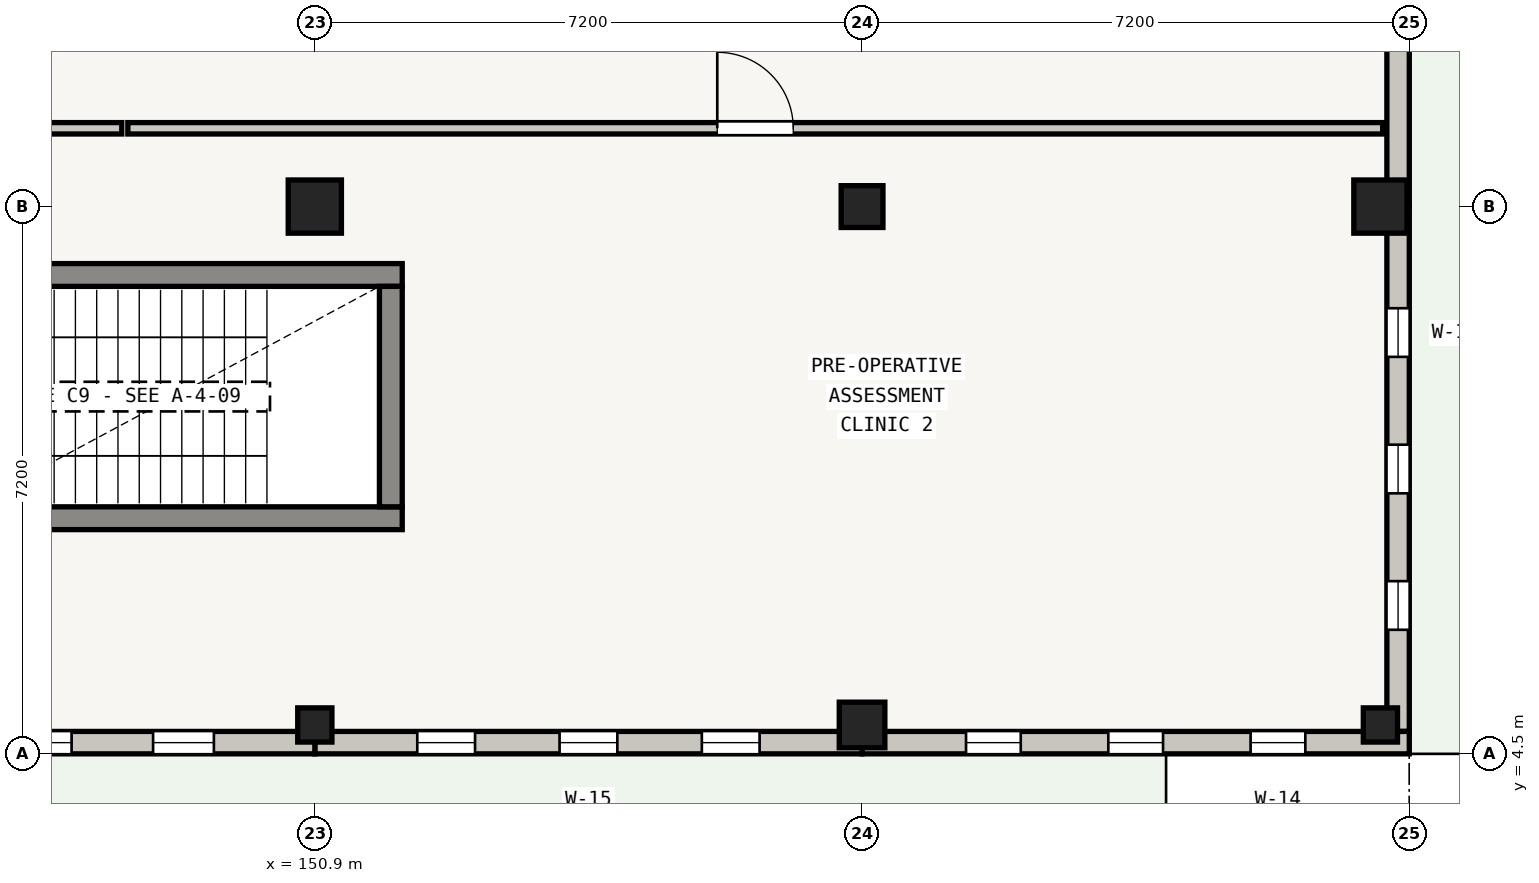
"""IFC4 building model, lengths in metres.
Left out: names, types, materials, properties, quantities, classifications, styles, units other than length and angle.
Written with IfcOpenShell. Run it as: python <this file> out.ifc"""

import sys

from ifc_helpers import new_model, si_unit, direction, frame, frame_2d, origin, origin_2d, place, context, subcontext, project, spatial, rectangle, extrude, element, fill, save


model = new_model("IFC4")
c1 = context("Model", 3, precision=1e-05, world=origin(), true_north=direction((0.0, 1.0)))
c2 = subcontext(c1, "Body", "Model", "MODEL_VIEW")
j1 = project(units=[si_unit("LENGTHUNIT", "METRE"), si_unit("PLANEANGLEUNIT", "RADIAN")], contexts=[c1])
p1 = place(None, origin())
s1 = spatial("IfcSite", under=j1, at=p1, CompositionType="ELEMENT")
p2 = place(p1, origin())
s2 = spatial("IfcBuilding", under=s1, at=p2, CompositionType="ELEMENT")
p3 = place(p2, origin())
s3 = spatial("IfcBuildingStorey", under=s2, at=p3, CompositionType="ELEMENT", Elevation=0.0)
p4 = place(p3, frame((150.9, 4.88, 0.0), z_axis=(0.0, 0.0, 1.0), x_axis=(1.0, 0.0, 0.0)))
e1 = element("IfcColumn", 1, at=p4, inside=s3, PredefinedType="COLUMN", context=c2, shape_type="SweptSolid", body=[
    extrude(rectangle(XDim=0.45, YDim=0.45, at=origin_2d()), origin(), (0.0, 0.0, 1.0), 4.205),
])
p5 = place(p3, frame((150.9, 11.7, 0.0), z_axis=(0.0, 0.0, 1.0), x_axis=(1.0, 0.0, 0.0)))
e2 = element("IfcColumn", 2, at=p5, inside=s3, PredefinedType="COLUMN", context=c2, shape_type="SweptSolid", body=[
    extrude(rectangle(XDim=0.7, YDim=0.7, at=origin_2d()), origin(), (0.0, 0.0, 1.0), 4.205),
])
p6 = place(p3, frame((158.1, 4.88, 0.0), z_axis=(0.0, 0.0, 1.0), x_axis=(1.0, 0.0, 0.0)))
e3 = element("IfcColumn", 3, at=p6, inside=s3, PredefinedType="COLUMN", context=c2, shape_type="SweptSolid", body=[
    extrude(rectangle(XDim=0.6, YDim=0.6, at=origin_2d()), origin(), (0.0, 0.0, 1.0), 4.205),
])
p7 = place(p3, frame((158.1, 11.7, 0.0), z_axis=(0.0, 0.0, 1.0), x_axis=(1.0, 0.0, 0.0)))
e4 = element("IfcColumn", 4, at=p7, inside=s3, PredefinedType="COLUMN", context=c2, shape_type="SweptSolid", body=[
    extrude(rectangle(XDim=0.55, YDim=0.55, at=origin_2d()), origin(), (0.0, 0.0, 1.0), 4.205),
])
p8 = place(p3, frame((164.92, 4.88, 0.0), z_axis=(0.0, 0.0, 1.0), x_axis=(1.0, 0.0, 0.0)))
e5 = element("IfcColumn", 5, at=p8, inside=s3, PredefinedType="COLUMN", context=c2, shape_type="SweptSolid", body=[
    extrude(rectangle(XDim=0.45, YDim=0.45, at=origin_2d()), origin(), (0.0, 0.0, 1.0), 4.205),
])
p9 = place(p3, frame((164.92, 11.7, 0.0), z_axis=(0.0, 0.0, 1.0), x_axis=(1.0, 0.0, 0.0)))
e6 = element("IfcColumn", 6, at=p9, inside=s3, PredefinedType="COLUMN", context=c2, shape_type="SweptSolid", body=[
    extrude(rectangle(XDim=0.7, YDim=0.7, at=origin_2d()), origin(), (0.0, 0.0, 1.0), 4.205),
])
p10 = place(p3, frame((165.153, 18.605, 0.0), z_axis=(0.0, 0.0, 1.0), x_axis=(0.0, -1.0, 0.0)))
e7 = element("IfcWall", 7, at=p10, inside=s3, PredefinedType="STANDARD", context=c2, shape_type="SweptSolid", body=[
    extrude(rectangle(XDim=6.905, YDim=0.295, at=frame_2d((3.453, 0.0))), origin(), (0.0, 0.0, 1.0), 3.57),
])
p11 = place(p10, frame((1.357, 0.0, 0.55)))
e8 = element("IfcOpeningElement", 8, at=p11, cuts=e7, PredefinedType="OPENING", context=c2, shape_type="SweptSolid", body=[
    extrude(rectangle(XDim=0.6, YDim=2.28, at=frame_2d((0.3, 1.14))), frame((0.0, 0.147, 0.0), z_axis=(0.0, -1.0, 0.0), x_axis=(1.0, 0.0, 0.0)), (0.0, 0.0, 1.0), 0.295),
])
p12 = place(p10, frame((3.903, 0.0, 0.55)))
e9 = element("IfcOpeningElement", 9, at=p12, cuts=e7, PredefinedType="OPENING", context=c2, shape_type="SweptSolid", body=[
    extrude(rectangle(XDim=0.6, YDim=2.28, at=frame_2d((0.3, 1.14))), frame((0.0, 0.147, 0.0), z_axis=(0.0, -1.0, 0.0), x_axis=(1.0, 0.0, 0.0)), (0.0, 0.0, 1.0), 0.295),
])
p13 = place(p3, frame((165.153, 11.7, 0.0), z_axis=(0.0, 0.0, 1.0), x_axis=(0.0, -1.0, 0.0)))
e10 = element("IfcWall", 10, at=p13, inside=s3, PredefinedType="STANDARD", context=c2, shape_type="SweptSolid", body=[
    extrude(rectangle(XDim=6.905, YDim=0.295, at=frame_2d((3.453, 0.0))), origin(), (0.0, 0.0, 1.0), 3.57),
])
p14 = place(p13, frame((1.337, 0.0, 0.55)))
e11 = element("IfcOpeningElement", 11, at=p14, cuts=e10, PredefinedType="OPENING", context=c2, shape_type="SweptSolid", body=[
    extrude(rectangle(XDim=0.64, YDim=2.28, at=frame_2d((0.32, 1.14))), frame((0.0, 0.147, 0.0), z_axis=(0.0, -1.0, 0.0), x_axis=(1.0, 0.0, 0.0)), (0.0, 0.0, 1.0), 0.295),
])
p15 = place(p13, frame((3.133, 0.0, 0.55)))
e12 = element("IfcOpeningElement", 12, at=p15, cuts=e10, PredefinedType="OPENING", context=c2, shape_type="SweptSolid", body=[
    extrude(rectangle(XDim=0.64, YDim=2.28, at=frame_2d((0.32, 1.14))), frame((0.0, 0.147, 0.0), z_axis=(0.0, -1.0, 0.0), x_axis=(1.0, 0.0, 0.0)), (0.0, 0.0, 1.0), 0.295),
])
p16 = place(p13, frame((4.928, 0.0, 0.55)))
e13 = element("IfcOpeningElement", 13, at=p16, cuts=e10, PredefinedType="OPENING", context=c2, shape_type="SweptSolid", body=[
    extrude(rectangle(XDim=0.64, YDim=2.28, at=frame_2d((0.32, 1.14))), frame((0.0, 0.147, 0.0), z_axis=(0.0, -1.0, 0.0), x_axis=(1.0, 0.0, 0.0)), (0.0, 0.0, 1.0), 0.295),
])
p17 = place(p3, frame((165.3, 4.647, 0.0), z_axis=(0.0, 0.0, 1.0), x_axis=(-1.0, 0.0, 0.0)))
e14 = element("IfcWall", 14, at=p17, inside=s3, PredefinedType="STANDARD", context=c2, shape_type="SweptSolid", body=[
    extrude(rectangle(XDim=7.2, YDim=0.295, at=frame_2d((3.6, 0.0))), origin(), (0.0, 0.0, 1.0), 3.61),
])
p18 = place(p17, frame((1.368, 0.0, 0.55)))
e15 = element("IfcOpeningElement", 15, at=p18, cuts=e14, PredefinedType="OPENING", context=c2, shape_type="SweptSolid", body=[
    extrude(rectangle(XDim=0.72, YDim=2.22, at=frame_2d((0.36, 1.11))), frame((0.0, 0.147, 0.0), z_axis=(0.0, -1.0, 0.0), x_axis=(1.0, 0.0, 0.0)), (0.0, 0.0, 1.0), 0.295),
])
p19 = place(p17, frame((3.24, 0.0, 0.55)))
e16 = element("IfcOpeningElement", 16, at=p19, cuts=e14, PredefinedType="OPENING", context=c2, shape_type="SweptSolid", body=[
    extrude(rectangle(XDim=0.72, YDim=2.22, at=frame_2d((0.36, 1.11))), frame((0.0, 0.147, 0.0), z_axis=(0.0, -1.0, 0.0), x_axis=(1.0, 0.0, 0.0)), (0.0, 0.0, 1.0), 0.295),
])
p20 = place(p17, frame((5.112, 0.0, 0.55)))
e17 = element("IfcOpeningElement", 17, at=p20, cuts=e14, PredefinedType="OPENING", context=c2, shape_type="SweptSolid", body=[
    extrude(rectangle(XDim=0.72, YDim=2.22, at=frame_2d((0.36, 1.11))), frame((0.0, 0.147, 0.0), z_axis=(0.0, -1.0, 0.0), x_axis=(1.0, 0.0, 0.0)), (0.0, 0.0, 1.0), 0.295),
])
p21 = place(p3, frame((158.1, 4.647, 0.0), z_axis=(0.0, 0.0, 1.0), x_axis=(-1.0, 0.0, 0.0)))
e18 = element("IfcWall", 18, at=p21, inside=s3, PredefinedType="STANDARD", context=c2, shape_type="SweptSolid", body=[
    extrude(rectangle(XDim=7.2, YDim=0.295, at=frame_2d((3.6, 0.0))), origin(), (0.0, 0.0, 1.0), 3.59),
])
p22 = place(p21, frame((1.348, 0.0, 0.55)))
e19 = element("IfcOpeningElement", 19, at=p22, cuts=e18, PredefinedType="OPENING", context=c2, shape_type="SweptSolid", body=[
    extrude(rectangle(XDim=0.76, YDim=2.16, at=frame_2d((0.38, 1.08))), frame((0.0, 0.147, 0.0), z_axis=(0.0, -1.0, 0.0), x_axis=(1.0, 0.0, 0.0)), (0.0, 0.0, 1.0), 0.295),
])
p23 = place(p21, frame((3.22, 0.0, 0.55)))
e20 = element("IfcOpeningElement", 20, at=p23, cuts=e18, PredefinedType="OPENING", context=c2, shape_type="SweptSolid", body=[
    extrude(rectangle(XDim=0.76, YDim=2.16, at=frame_2d((0.38, 1.08))), frame((0.0, 0.147, 0.0), z_axis=(0.0, -1.0, 0.0), x_axis=(1.0, 0.0, 0.0)), (0.0, 0.0, 1.0), 0.295),
])
p24 = place(p21, frame((5.092, 0.0, 0.55)))
e21 = element("IfcOpeningElement", 21, at=p24, cuts=e18, PredefinedType="OPENING", context=c2, shape_type="SweptSolid", body=[
    extrude(rectangle(XDim=0.76, YDim=2.16, at=frame_2d((0.38, 1.08))), frame((0.0, 0.147, 0.0), z_axis=(0.0, -1.0, 0.0), x_axis=(1.0, 0.0, 0.0)), (0.0, 0.0, 1.0), 0.295),
])
p25 = place(p3, frame((150.9, 4.647, 0.0), z_axis=(0.0, 0.0, 1.0), x_axis=(-1.0, 0.0, 0.0)))
e22 = element("IfcWall", 22, at=p25, inside=s3, PredefinedType="STANDARD", context=c2, shape_type="SweptSolid", body=[
    extrude(rectangle(XDim=7.2, YDim=0.295, at=frame_2d((3.6, 0.0))), origin(), (0.0, 0.0, 1.0), 3.59),
])
p26 = place(p25, frame((1.328, 0.0, 0.55)))
e23 = element("IfcOpeningElement", 23, at=p26, cuts=e22, PredefinedType="OPENING", context=c2, shape_type="SweptSolid", body=[
    extrude(rectangle(XDim=0.8, YDim=2.16, at=frame_2d((0.4, 1.08))), frame((0.0, 0.147, 0.0), z_axis=(0.0, -1.0, 0.0), x_axis=(1.0, 0.0, 0.0)), (0.0, 0.0, 1.0), 0.295),
])
p27 = place(p25, frame((3.2, 0.0, 0.55)))
e24 = element("IfcOpeningElement", 24, at=p27, cuts=e22, PredefinedType="OPENING", context=c2, shape_type="SweptSolid", body=[
    extrude(rectangle(XDim=0.8, YDim=2.16, at=frame_2d((0.4, 1.08))), frame((0.0, 0.147, 0.0), z_axis=(0.0, -1.0, 0.0), x_axis=(1.0, 0.0, 0.0)), (0.0, 0.0, 1.0), 0.295),
])
p28 = place(p25, frame((5.072, 0.0, 0.55)))
e25 = element("IfcOpeningElement", 25, at=p28, cuts=e22, PredefinedType="OPENING", context=c2, shape_type="SweptSolid", body=[
    extrude(rectangle(XDim=0.8, YDim=2.16, at=frame_2d((0.4, 1.08))), frame((0.0, 0.147, 0.0), z_axis=(0.0, -1.0, 0.0), x_axis=(1.0, 0.0, 0.0)), (0.0, 0.0, 1.0), 0.295),
])
p29 = place(p3, frame((152.05, 7.6, 0.0), z_axis=(0.0, 0.0, 1.0), x_axis=(-1.0, 0.0, 0.0)))
e26 = element("IfcWall", 26, at=p29, inside=s3, PredefinedType="SHEAR", context=c2, shape_type="SweptSolid", body=[
    extrude(rectangle(XDim=7.3, YDim=0.3, at=frame_2d((3.65, 0.0))), origin(), (0.0, 0.0, 1.0), 4.205),
])
p30 = place(p3, frame((144.75, 10.8, 0.0), z_axis=(0.0, 0.0, 1.0), x_axis=(1.0, 0.0, 0.0)))
e27 = element("IfcWall", 27, at=p30, inside=s3, PredefinedType="SHEAR", context=c2, shape_type="SweptSolid", body=[
    extrude(rectangle(XDim=7.3, YDim=0.3, at=frame_2d((3.65, 0.0))), origin(), (0.0, 0.0, 1.0), 4.205),
])
p31 = place(p30, frame((0.16, 0.0, 0.0)))
e28 = element("IfcOpeningElement", 28, at=p31, cuts=e27, PredefinedType="OPENING", context=c2, shape_type="SweptSolid", body=[
    extrude(rectangle(XDim=1.1, YDim=2.05, at=frame_2d((0.55, 1.025))), frame((0.0, 0.15, 0.0), z_axis=(0.0, -1.0, 0.0), x_axis=(1.0, 0.0, 0.0)), (0.0, 0.0, 1.0), 0.3),
])
p32 = place(p3, frame((151.9, 10.65, 0.0), z_axis=(0.0, 0.0, 1.0), x_axis=(0.0, -1.0, 0.0)))
e29 = element("IfcWall", 29, at=p32, inside=s3, PredefinedType="SHEAR", context=c2, shape_type="SweptSolid", body=[
    extrude(rectangle(XDim=2.9, YDim=0.3, at=frame_2d((1.45, 0.0))), origin(), (0.0, 0.0, 1.0), 4.205),
])
p33 = place(p3, frame((148.44, 12.73, 0.0), z_axis=(0.0, 0.0, 1.0), x_axis=(1.0, 0.0, 0.0)))
e30 = element("IfcWall", 30, at=p33, inside=s3, PredefinedType="PARTITIONING", context=c2, shape_type="SweptSolid", body=[
    extrude(rectangle(XDim=16.51, YDim=0.15, at=frame_2d((8.255, 0.0))), origin(), (0.0, 0.0, 1.0), 3.225),
])
p34 = place(p33, frame((7.755, 0.0, 0.0)))
e31 = element("IfcOpeningElement", 31, at=p34, cuts=e30, PredefinedType="OPENING", context=c2, shape_type="SweptSolid", body=[
    extrude(rectangle(XDim=1.0, YDim=2.05, at=frame_2d((0.5, 1.025))), frame((0.0, 0.075, 0.0), z_axis=(0.0, -1.0, 0.0), x_axis=(1.0, 0.0, 0.0)), (0.0, 0.0, 1.0), 0.15),
])
p35 = place(p3, frame((133.66, 12.73, 0.0), z_axis=(0.0, 0.0, 1.0), x_axis=(1.0, 0.0, 0.0)))
e32 = element("IfcWall", 32, at=p35, inside=s3, PredefinedType="PARTITIONING", context=c2, shape_type="SweptSolid", body=[
    extrude(rectangle(XDim=14.7, YDim=0.15, at=frame_2d((7.35, 0.0))), origin(), (0.0, 0.0, 1.0), 3.225),
])
p36 = place(p35, frame((6.83, 0.0, 0.0)))
e33 = element("IfcOpeningElement", 33, at=p36, cuts=e32, PredefinedType="OPENING", context=c2, shape_type="SweptSolid", body=[
    extrude(rectangle(XDim=1.04, YDim=2.05, at=frame_2d((0.52, 1.025))), frame((0.0, 0.075, 0.0), z_axis=(0.0, -1.0, 0.0), x_axis=(1.0, 0.0, 0.0)), (0.0, 0.0, 1.0), 0.15),
])
p37 = place(p14, origin())
e34 = element("IfcWindow", 34, at=p37, inside=s3, PartitioningType="SINGLE_PANEL", PredefinedType="WINDOW", context=c2, shape_type="SweptSolid", body=[
    extrude(rectangle(XDim=0.64, YDim=2.28, at=frame_2d((0.32, 1.14))), frame((0.0, 0.03, 0.0), z_axis=(0.0, -1.0, 0.0), x_axis=(1.0, 0.0, 0.0)), (0.0, 0.0, 1.0), 0.06),
])
fill(e11, e34)
p38 = place(p15, origin())
e35 = element("IfcWindow", 35, at=p38, inside=s3, PartitioningType="SINGLE_PANEL", PredefinedType="WINDOW", context=c2, shape_type="SweptSolid", body=[
    extrude(rectangle(XDim=0.64, YDim=2.28, at=frame_2d((0.32, 1.14))), frame((0.0, 0.03, 0.0), z_axis=(0.0, -1.0, 0.0), x_axis=(1.0, 0.0, 0.0)), (0.0, 0.0, 1.0), 0.06),
])
fill(e12, e35)
p39 = place(p16, origin())
e36 = element("IfcWindow", 36, at=p39, inside=s3, PartitioningType="SINGLE_PANEL", PredefinedType="WINDOW", context=c2, shape_type="SweptSolid", body=[
    extrude(rectangle(XDim=0.64, YDim=2.28, at=frame_2d((0.32, 1.14))), frame((0.0, 0.03, 0.0), z_axis=(0.0, -1.0, 0.0), x_axis=(1.0, 0.0, 0.0)), (0.0, 0.0, 1.0), 0.06),
])
fill(e13, e36)
p40 = place(p18, origin())
e37 = element("IfcWindow", 37, at=p40, inside=s3, PartitioningType="SINGLE_PANEL", PredefinedType="WINDOW", context=c2, shape_type="SweptSolid", body=[
    extrude(rectangle(XDim=0.72, YDim=2.22, at=frame_2d((0.36, 1.11))), frame((0.0, 0.03, 0.0), z_axis=(0.0, -1.0, 0.0), x_axis=(1.0, 0.0, 0.0)), (0.0, 0.0, 1.0), 0.06),
])
fill(e15, e37)
p41 = place(p19, origin())
e38 = element("IfcWindow", 38, at=p41, inside=s3, PartitioningType="SINGLE_PANEL", PredefinedType="WINDOW", context=c2, shape_type="SweptSolid", body=[
    extrude(rectangle(XDim=0.72, YDim=2.22, at=frame_2d((0.36, 1.11))), frame((0.0, 0.03, 0.0), z_axis=(0.0, -1.0, 0.0), x_axis=(1.0, 0.0, 0.0)), (0.0, 0.0, 1.0), 0.06),
])
fill(e16, e38)
p42 = place(p20, origin())
e39 = element("IfcWindow", 39, at=p42, inside=s3, PartitioningType="SINGLE_PANEL", PredefinedType="WINDOW", context=c2, shape_type="SweptSolid", body=[
    extrude(rectangle(XDim=0.72, YDim=2.22, at=frame_2d((0.36, 1.11))), frame((0.0, 0.03, 0.0), z_axis=(0.0, -1.0, 0.0), x_axis=(1.0, 0.0, 0.0)), (0.0, 0.0, 1.0), 0.06),
])
fill(e17, e39)
p43 = place(p22, origin())
e40 = element("IfcWindow", 40, at=p43, inside=s3, PartitioningType="SINGLE_PANEL", PredefinedType="WINDOW", context=c2, shape_type="SweptSolid", body=[
    extrude(rectangle(XDim=0.76, YDim=2.16, at=frame_2d((0.38, 1.08))), frame((0.0, 0.03, 0.0), z_axis=(0.0, -1.0, 0.0), x_axis=(1.0, 0.0, 0.0)), (0.0, 0.0, 1.0), 0.06),
])
fill(e19, e40)
p44 = place(p23, origin())
e41 = element("IfcWindow", 41, at=p44, inside=s3, PartitioningType="SINGLE_PANEL", PredefinedType="WINDOW", context=c2, shape_type="SweptSolid", body=[
    extrude(rectangle(XDim=0.76, YDim=2.16, at=frame_2d((0.38, 1.08))), frame((0.0, 0.03, 0.0), z_axis=(0.0, -1.0, 0.0), x_axis=(1.0, 0.0, 0.0)), (0.0, 0.0, 1.0), 0.06),
])
fill(e20, e41)
p45 = place(p24, origin())
e42 = element("IfcWindow", 42, at=p45, inside=s3, PartitioningType="SINGLE_PANEL", PredefinedType="WINDOW", context=c2, shape_type="SweptSolid", body=[
    extrude(rectangle(XDim=0.76, YDim=2.16, at=frame_2d((0.38, 1.08))), frame((0.0, 0.03, 0.0), z_axis=(0.0, -1.0, 0.0), x_axis=(1.0, 0.0, 0.0)), (0.0, 0.0, 1.0), 0.06),
])
fill(e21, e42)
p46 = place(p26, origin())
e43 = element("IfcWindow", 43, at=p46, inside=s3, PartitioningType="SINGLE_PANEL", PredefinedType="WINDOW", context=c2, shape_type="SweptSolid", body=[
    extrude(rectangle(XDim=0.8, YDim=2.16, at=frame_2d((0.4, 1.08))), frame((0.0, 0.03, 0.0), z_axis=(0.0, -1.0, 0.0), x_axis=(1.0, 0.0, 0.0)), (0.0, 0.0, 1.0), 0.06),
])
fill(e23, e43)
p47 = place(p27, origin())
e44 = element("IfcWindow", 44, at=p47, inside=s3, PartitioningType="SINGLE_PANEL", PredefinedType="WINDOW", context=c2, shape_type="SweptSolid", body=[
    extrude(rectangle(XDim=0.8, YDim=2.16, at=frame_2d((0.4, 1.08))), frame((0.0, 0.03, 0.0), z_axis=(0.0, -1.0, 0.0), x_axis=(1.0, 0.0, 0.0)), (0.0, 0.0, 1.0), 0.06),
])
fill(e24, e44)
p48 = place(p34, origin())
e45 = element("IfcDoor", 45, at=p48, inside=s3, OperationType="SINGLE_SWING_LEFT", PredefinedType="DOOR", context=c2, shape_type="SweptSolid", body=[
    extrude(rectangle(XDim=1.0, YDim=2.05, at=frame_2d((0.5, 1.025))), frame((0.0, 0.025, 0.0), z_axis=(0.0, -1.0, 0.0), x_axis=(1.0, 0.0, 0.0)), (0.0, 0.0, 1.0), 0.05),
])
fill(e31, e45)
save(model, sys.argv[1])
